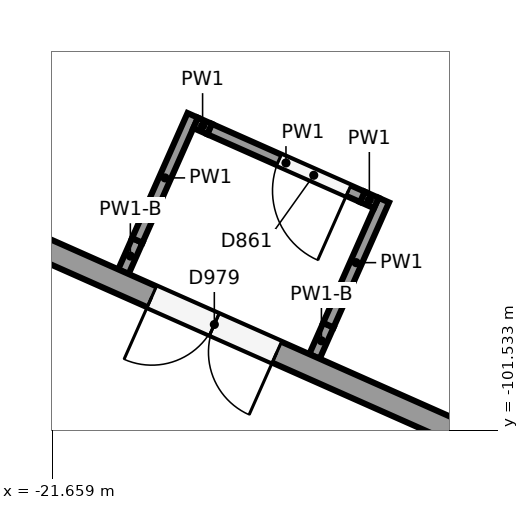
"""IFC4 building model, lengths in metres.
Left out: names, types, materials, properties, quantities, classifications, styles, units other than length and angle.
Written with IfcOpenShell. Run it as: python <this file> out.ifc"""

import sys

from ifc_helpers import new_model, si_unit, direction, frame, frame_2d, origin, place, context, subcontext, project, spatial, rectangle, extrude, element, fill, save


model = new_model("IFC4")
c1 = context("Model", 3, precision=1e-05, world=origin(), true_north=direction((0.0, 1.0)))
c2 = subcontext(c1, "Body", "Model", "MODEL_VIEW")
j1 = project(units=[si_unit("LENGTHUNIT", "METRE"), si_unit("PLANEANGLEUNIT", "RADIAN")], contexts=[c1])
p1 = place(None, origin())
s1 = spatial("IfcSite", under=j1, at=p1, CompositionType="ELEMENT")
p2 = place(p1, origin())
s2 = spatial("IfcBuilding", under=s1, at=p2, CompositionType="ELEMENT")
p3 = place(p2, origin())
s3 = spatial("IfcBuildingStorey", under=s2, at=p3, CompositionType="ELEMENT", Elevation=0.0)
p4 = place(p3, frame((-8.123, -105.198, 0.0), z_axis=(0.0, 0.0, 1.0), x_axis=(-0.914138897099, 0.405401130748, 0.0)))
e1 = element("IfcWall", 1, at=p4, inside=s3, PredefinedType="SOLIDWALL", context=c2, shape_type="SweptSolid", body=[
    extrude(rectangle(XDim=15.824, YDim=0.3, at=frame_2d((7.912, 0.0))), origin(), (0.0, 0.0, 1.0), 4.85),
])
p5 = place(p4, frame((11.574, 0.0, 0.0)))
e2 = element("IfcOpeningElement", 2, at=p5, cuts=e1, PredefinedType="OPENING", context=c2, shape_type="SweptSolid", body=[
    extrude(rectangle(XDim=1.8, YDim=2.4, at=frame_2d((0.9, 1.2))), frame((0.0, 0.16, 0.0), z_axis=(0.0, -1.0, 0.0), x_axis=(1.0, 0.0, 0.0)), (0.0, 0.0, 1.0), 0.32),
])
p6 = place(p3, frame((-18.208, -100.561, 0.0), z_axis=(0.0, 0.0, 1.0), x_axis=(0.405282518143, 0.914191490054, 0.0)))
e3 = element("IfcWall", 3, at=p6, inside=s3, PredefinedType="PARTITIONING", context=c2, shape_type="SweptSolid", body=[
    extrude(rectangle(XDim=0.45, YDim=0.15, at=frame_2d((0.225, 0.0))), origin(), (0.0, 0.0, 1.0), 4.85),
])
p7 = place(p3, frame((-18.026, -100.149, 0.0), z_axis=(0.0, 0.0, 1.0), x_axis=(0.405395866652, 0.914141231595, 0.0)))
e4 = element("IfcWall", 4, at=p7, inside=s3, PredefinedType="PARTITIONING", context=c2, shape_type="SweptSolid", body=[
    extrude(rectangle(XDim=1.8, YDim=0.15, at=frame_2d((0.9, 0.0))), origin(), (0.0, 0.0, 1.0), 6.15),
])
p8 = place(p3, frame((-20.722, -99.446, 0.0), z_axis=(0.0, 0.0, 1.0), x_axis=(0.405282518143, 0.914191490054, 0.0)))
e5 = element("IfcWall", 5, at=p8, inside=s3, PredefinedType="PARTITIONING", context=c2, shape_type="SweptSolid", body=[
    extrude(rectangle(XDim=0.45, YDim=0.15, at=frame_2d((0.225, 0.0))), origin(), (0.0, 0.0, 1.0), 4.85),
])
p9 = place(p3, frame((-20.54, -99.035, 0.0), z_axis=(0.0, 0.0, 1.0), x_axis=(0.405395866652, 0.914141231595, 0.0)))
e6 = element("IfcWall", 6, at=p9, inside=s3, PredefinedType="PARTITIONING", context=c2, shape_type="SweptSolid", body=[
    extrude(rectangle(XDim=1.8, YDim=0.15, at=frame_2d((0.9, 0.0))), origin(), (0.0, 0.0, 1.0), 6.15),
])
p10 = place(p3, frame((-17.395, -98.542, 0.0), z_axis=(0.0, 0.0, 1.0), x_axis=(-0.914213764774, 0.405232269566, 0.0)))
e7 = element("IfcWall", 7, at=p10, inside=s3, PredefinedType="PARTITIONING", context=c2, shape_type="SweptSolid", body=[
    extrude(rectangle(XDim=0.2, YDim=0.15, at=frame_2d((0.1, 0.0))), origin(), (0.0, 0.0, 1.0), 6.15),
])
p11 = place(p3, frame((-17.578, -98.461, 0.0), z_axis=(0.0, 0.0, 1.0), x_axis=(-0.914113298408, 0.405458848311, 0.0)))
e8 = element("IfcWall", 8, at=p11, inside=s3, PredefinedType="PARTITIONING", context=c2, shape_type="SweptSolid", body=[
    extrude(rectangle(XDim=2.2, YDim=0.15, at=frame_2d((1.1, 0.0))), origin(), (0.0, 0.0, 1.0), 6.15),
])
p12 = place(p11, frame((0.2, 0.0, 0.0)))
e9 = element("IfcOpeningElement", 9, at=p12, cuts=e8, PredefinedType="OPENING", context=c2, shape_type="SweptSolid", body=[
    extrude(rectangle(XDim=1.0, YDim=2.1, at=frame_2d((0.5, 1.05))), frame((0.0, 0.085, 0.0), z_axis=(0.0, -1.0, 0.0), x_axis=(1.0, 0.0, 0.0)), (0.0, 0.0, 1.0), 0.17),
])
p13 = place(p3, frame((-19.589, -97.569, 0.0), z_axis=(0.0, 0.0, 1.0), x_axis=(-0.914213764774, 0.405232269566, 0.0)))
e10 = element("IfcWall", 10, at=p13, inside=s3, PredefinedType="PARTITIONING", context=c2, shape_type="SweptSolid", body=[
    extrude(rectangle(XDim=0.2, YDim=0.15, at=frame_2d((0.1, 0.0))), origin(), (0.0, 0.0, 1.0), 6.15),
])
p14 = place(p5, origin())
e11 = element("IfcDoor", 11, at=p14, inside=s3, OperationType="DOUBLE_DOOR_SINGLE_SWING", PredefinedType="DOOR", context=c2, shape_type="SweptSolid", body=[
    extrude(rectangle(XDim=1.8, YDim=2.4, at=frame_2d((0.9, 1.2))), frame((0.0, 0.025, 0.0), z_axis=(0.0, -1.0, 0.0), x_axis=(1.0, 0.0, 0.0)), (0.0, 0.0, 1.0), 0.05),
])
fill(e2, e11)
p15 = place(p12, origin())
e12 = element("IfcDoor", 12, at=p15, inside=s3, OperationType="SINGLE_SWING_LEFT", PredefinedType="DOOR", context=c2, shape_type="SweptSolid", body=[
    extrude(rectangle(XDim=1.0, YDim=2.1, at=frame_2d((0.5, 1.05))), frame((0.0, 0.025, 0.0), z_axis=(0.0, -1.0, 0.0), x_axis=(1.0, 0.0, 0.0)), (0.0, 0.0, 1.0), 0.05),
])
fill(e9, e12)
save(model, sys.argv[1])
